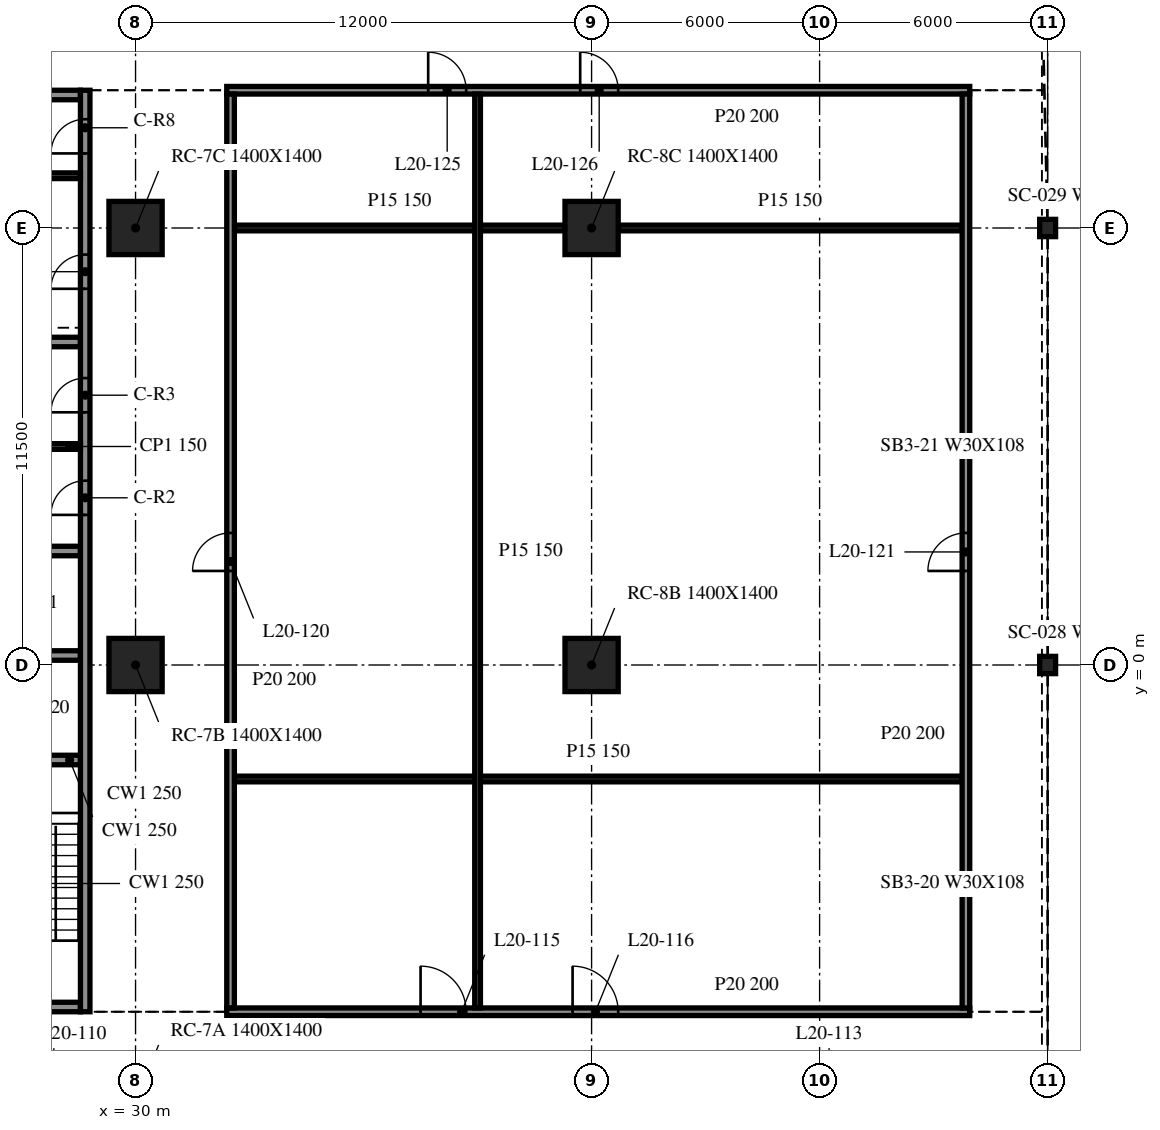
"""IFC4 building model, lengths in metres.
Left out: names, types, materials, properties, quantities, classifications, styles, units other than length and angle.
Written with IfcOpenShell. Run it as: python <this file> out.ifc"""

import sys

from ifc_helpers import new_model, si_unit, direction, frame, frame_2d, origin, origin_2d, place, context, subcontext, project, spatial, rectangle, i_section, extrude, element, fill, save


model = new_model("IFC4")
c1 = context("Model", 3, precision=1e-05, world=origin(), true_north=direction((0.0, 1.0)))
c2 = subcontext(c1, "Body", "Model", "MODEL_VIEW")
j1 = project(units=[si_unit("LENGTHUNIT", "METRE"), si_unit("PLANEANGLEUNIT", "RADIAN")], contexts=[c1])
p1 = place(None, origin())
s1 = spatial("IfcSite", under=j1, at=p1, CompositionType="ELEMENT")
p2 = place(p1, origin())
s2 = spatial("IfcBuilding", under=s1, at=p2, CompositionType="ELEMENT")
p3 = place(p2, frame((0.0, 0.0, 88.9)))
s3 = spatial("IfcBuildingStorey", under=s2, at=p3, CompositionType="ELEMENT", Elevation=88.9)
for number, where, z_axis, x_axis in (
    (1, (30.0, 0.0, -0.34), (0.0, 0.0, 1.0), (1.0, 0.0, 0.0)),
    (2, (30.0, 11.5, -0.34), (0.0, 0.0, 1.0), (1.0, 0.0, 0.0)),
    (3, (42.0, 0.0, -0.34), (0.0, 0.0, 1.0), (1.0, 0.0, 0.0)),
    (4, (42.0, 11.5, -0.34), (0.0, 0.0, 1.0), (1.0, 0.0, 0.0)),
):
    element("IfcColumn", number, at=place(p3, frame(where, z_axis=z_axis, x_axis=x_axis)), inside=s3, PredefinedType="COLUMN", context=c2, shape_type="SweptSolid", body=[
        extrude(rectangle(XDim=1.4, YDim=1.4, at=origin_2d()), origin(), (0.0, 0.0, 1.0), 4.1),
    ])
for number, where, z_axis, x_axis in (
    (5, (54.0, 0.0, -0.34), (0.0, 0.0, 1.0), (1.0, 0.0, 0.0)),
    (6, (54.0, 11.5, -0.34), (0.0, 0.0, 1.0), (1.0, 0.0, 0.0)),
):
    element("IfcColumn", number, at=place(p3, frame(where, z_axis=z_axis, x_axis=x_axis)), inside=s3, PredefinedType="COLUMN", context=c2, shape_type="SweptSolid", body=[
        extrude(i_section(OverallWidth=0.419, OverallDepth=0.455, WebThickness=0.042, FlangeThickness=0.068, at=origin_2d()), origin(), (0.0, 0.0, 1.0), 4.1),
    ])
p4 = place(p3, frame((28.675, -9.125, 0.0), z_axis=(0.0, 0.0, 1.0), x_axis=(0.0, 1.0, 0.0)))
e7 = element("IfcWall", 7, at=p4, inside=s3, PredefinedType="SOLIDWALL", context=c2, shape_type="SweptSolid", body=[
    extrude(rectangle(XDim=24.25, YDim=0.25, at=frame_2d((12.125, 0.0))), origin(), (0.0, 0.0, 1.0), 3.76),
])
p5 = place(p4, frame((13.075, 0.0, 0.0)))
e8 = element("IfcOpeningElement", 8, at=p5, cuts=e7, PredefinedType="OPENING", context=c2, shape_type="SweptSolid", body=[
    extrude(rectangle(XDim=0.9, YDim=2.1, at=frame_2d((0.45, 1.05))), frame((0.0, 0.135, 0.0), z_axis=(0.0, -1.0, 0.0), x_axis=(1.0, 0.0, 0.0)), (0.0, 0.0, 1.0), 0.27),
])
p6 = place(p4, frame((15.775, 0.0, 0.0)))
e9 = element("IfcOpeningElement", 9, at=p6, cuts=e7, PredefinedType="OPENING", context=c2, shape_type="SweptSolid", body=[
    extrude(rectangle(XDim=0.9, YDim=2.1, at=frame_2d((0.45, 1.05))), frame((0.0, 0.135, 0.0), z_axis=(0.0, -1.0, 0.0), x_axis=(1.0, 0.0, 0.0)), (0.0, 0.0, 1.0), 0.27),
])
p7 = place(p4, frame((19.025, 0.0, 0.0)))
e10 = element("IfcOpeningElement", 10, at=p7, cuts=e7, PredefinedType="OPENING", context=c2, shape_type="SweptSolid", body=[
    extrude(rectangle(XDim=0.9, YDim=2.1, at=frame_2d((0.45, 1.05))), frame((0.0, 0.135, 0.0), z_axis=(0.0, -1.0, 0.0), x_axis=(1.0, 0.0, 0.0)), (0.0, 0.0, 1.0), 0.27),
])
p8 = place(p4, frame((22.587, 0.0, 0.0)))
e11 = element("IfcOpeningElement", 11, at=p8, cuts=e7, PredefinedType="OPENING", context=c2, shape_type="SweptSolid", body=[
    extrude(rectangle(XDim=0.9, YDim=2.1, at=frame_2d((0.45, 1.05))), frame((0.0, 0.135, 0.0), z_axis=(0.0, -1.0, 0.0), x_axis=(1.0, 0.0, 0.0)), (0.0, 0.0, 1.0), 0.27),
])
p9 = place(p3, frame((28.55, -9.0, 0.0), z_axis=(0.0, 0.0, 1.0), x_axis=(-1.0, 0.0, 0.0)))
e12 = element("IfcWall", 12, at=p9, inside=s3, PredefinedType="SOLIDWALL", context=c2, shape_type="SweptSolid", body=[
    extrude(rectangle(XDim=9.1, YDim=0.25, at=frame_2d((4.55, 0.0))), origin(), (0.0, 0.0, 1.0), 3.76),
])
p10 = place(p9, frame((3.65, 0.0, 0.0)))
e13 = element("IfcOpeningElement", 13, at=p10, cuts=e12, PredefinedType="OPENING", context=c2, shape_type="SweptSolid", body=[
    extrude(rectangle(XDim=1.8, YDim=2.1, at=frame_2d((0.9, 1.05))), frame((0.0, 0.135, 0.0), z_axis=(0.0, -1.0, 0.0), x_axis=(1.0, 0.0, 0.0)), (0.0, 0.0, 1.0), 0.27),
])
p11 = place(p3, frame((19.45, 15.0, 0.0), z_axis=(0.0, 0.0, 1.0), x_axis=(1.0, 0.0, 0.0)))
e14 = element("IfcWall", 14, at=p11, inside=s3, PredefinedType="SOLIDWALL", context=c2, shape_type="SweptSolid", body=[
    extrude(rectangle(XDim=9.1, YDim=0.25, at=frame_2d((4.55, 0.0))), origin(), (0.0, 0.0, 1.0), 3.76),
])
p12 = place(p11, frame((3.65, 0.0, 0.0)))
e15 = element("IfcOpeningElement", 15, at=p12, cuts=e14, PredefinedType="OPENING", context=c2, shape_type="SweptSolid", body=[
    extrude(rectangle(XDim=1.8, YDim=2.1, at=frame_2d((0.9, 1.05))), frame((0.0, 0.135, 0.0), z_axis=(0.0, -1.0, 0.0), x_axis=(1.0, 0.0, 0.0)), (0.0, 0.0, 1.0), 0.27),
])
for number, where, z_axis, x_axis in (
    (16, (25.7, -2.5, 0.0), (0.0, 0.0, 1.0), (1.0, 0.0, 0.0)),
    (17, (25.7, 0.25, 0.0), (0.0, 0.0, 1.0), (1.0, 0.0, 0.0)),
    (18, (25.7, 3.0, 0.0), (0.0, 0.0, 1.0), (1.0, 0.0, 0.0)),
    (19, (25.7, 8.5, 0.0), (0.0, 0.0, 1.0), (1.0, 0.0, 0.0)),
):
    element("IfcWall", number, at=place(p3, frame(where, z_axis=z_axis, x_axis=x_axis)), inside=s3, PredefinedType="SOLIDWALL", context=c2, shape_type="SweptSolid", body=[
        extrude(rectangle(XDim=2.85, YDim=0.25, at=frame_2d((1.425, 0.0))), origin(), (0.0, 0.0, 1.0), 3.76),
    ])
for number, where, z_axis, x_axis in (
    (20, (25.7, 5.75, 0.0), (0.0, 0.0, 1.0), (1.0, 0.0, 0.0)),
    (21, (25.7, 12.875, 0.0), (0.0, 0.0, 1.0), (1.0, 0.0, 0.0)),
):
    element("IfcWall", number, at=place(p3, frame(where, z_axis=z_axis, x_axis=x_axis)), inside=s3, PredefinedType="PARTITIONING", context=c2, shape_type="SweptSolid", body=[
        extrude(rectangle(XDim=2.85, YDim=0.15, at=frame_2d((1.425, 0.0))), origin(), (0.0, 0.0, 1.0), 3.76),
    ])
p13 = place(p3, frame((32.4, -9.125, 0.0), z_axis=(0.0, 0.0, 1.0), x_axis=(1.0, 0.0, 0.0)))
e22 = element("IfcWall", 22, at=p13, inside=s3, PredefinedType="PARTITIONING", context=c2, shape_type="SweptSolid", body=[
    extrude(rectangle(XDim=19.55, YDim=0.2, at=frame_2d((9.775, 0.0))), origin(), (0.0, 0.0, 1.0), 3.76),
])
p14 = place(p13, frame((5.1, 0.0, 0.0)))
e23 = element("IfcOpeningElement", 23, at=p14, cuts=e22, PredefinedType="OPENING", context=c2, shape_type="SweptSolid", body=[
    extrude(rectangle(XDim=1.2, YDim=2.1, at=frame_2d((0.6, 1.05))), frame((0.0, 0.11, 0.0), z_axis=(0.0, -1.0, 0.0), x_axis=(1.0, 0.0, 0.0)), (0.0, 0.0, 1.0), 0.22),
])
p15 = place(p13, frame((9.1, 0.0, 0.0)))
e24 = element("IfcOpeningElement", 24, at=p15, cuts=e22, PredefinedType="OPENING", context=c2, shape_type="SweptSolid", body=[
    extrude(rectangle(XDim=1.2, YDim=2.1, at=frame_2d((0.6, 1.05))), frame((0.0, 0.11, 0.0), z_axis=(0.0, -1.0, 0.0), x_axis=(1.0, 0.0, 0.0)), (0.0, 0.0, 1.0), 0.22),
])
p16 = place(p3, frame((32.6, -3.0, 0.0), z_axis=(0.0, 0.0, 1.0), x_axis=(1.0, 0.0, 0.0)))
e25 = element("IfcWall", 25, at=p16, inside=s3, PredefinedType="PARTITIONING", context=c2, shape_type="SweptSolid", body=[
    extrude(rectangle(XDim=19.15, YDim=0.15, at=frame_2d((9.575, 0.0))), origin(), (0.0, 0.0, 1.0), 3.76),
])
p17 = place(p3, frame((32.6, 11.5, 0.0), z_axis=(0.0, 0.0, 1.0), x_axis=(1.0, 0.0, 0.0)))
e26 = element("IfcWall", 26, at=p17, inside=s3, PredefinedType="PARTITIONING", context=c2, shape_type="SweptSolid", body=[
    extrude(rectangle(XDim=8.7, YDim=0.15, at=frame_2d((4.35, 0.0))), origin(), (0.0, 0.0, 1.0), 3.76),
])
p18 = place(p3, frame((42.7, 11.5, 0.0), z_axis=(0.0, 0.0, 1.0), x_axis=(1.0, 0.0, 0.0)))
e27 = element("IfcWall", 27, at=p18, inside=s3, PredefinedType="PARTITIONING", context=c2, shape_type="SweptSolid", body=[
    extrude(rectangle(XDim=9.05, YDim=0.15, at=frame_2d((4.525, 0.0))), origin(), (0.0, 0.0, 1.0), 3.76),
])
p19 = place(p3, frame((32.4, 15.125, 0.0), z_axis=(0.0, 0.0, 1.0), x_axis=(1.0, 0.0, 0.0)))
e28 = element("IfcWall", 28, at=p19, inside=s3, PredefinedType="PARTITIONING", context=c2, shape_type="SweptSolid", body=[
    extrude(rectangle(XDim=19.55, YDim=0.2, at=frame_2d((9.775, 0.0))), origin(), (0.0, 0.0, 1.0), 3.76),
])
p20 = place(p19, frame((5.3, 0.0, 0.0)))
e29 = element("IfcOpeningElement", 29, at=p20, cuts=e28, PredefinedType="OPENING", context=c2, shape_type="SweptSolid", body=[
    extrude(rectangle(XDim=1.0, YDim=2.1, at=frame_2d((0.5, 1.05))), frame((0.0, 0.11, 0.0), z_axis=(0.0, -1.0, 0.0), x_axis=(1.0, 0.0, 0.0)), (0.0, 0.0, 1.0), 0.22),
])
p21 = place(p19, frame((9.3, 0.0, 0.0)))
e30 = element("IfcOpeningElement", 30, at=p21, cuts=e28, PredefinedType="OPENING", context=c2, shape_type="SweptSolid", body=[
    extrude(rectangle(XDim=1.0, YDim=2.1, at=frame_2d((0.5, 1.05))), frame((0.0, 0.11, 0.0), z_axis=(0.0, -1.0, 0.0), x_axis=(1.0, 0.0, 0.0)), (0.0, 0.0, 1.0), 0.22),
])
p22 = place(p3, frame((32.5, -9.025, 0.0), z_axis=(0.0, 0.0, 1.0), x_axis=(0.0, 1.0, 0.0)))
e31 = element("IfcWall", 31, at=p22, inside=s3, PredefinedType="PARTITIONING", context=c2, shape_type="SweptSolid", body=[
    extrude(rectangle(XDim=24.05, YDim=0.2, at=frame_2d((12.025, 0.0))), origin(), (0.0, 0.0, 1.0), 3.76),
])
p23 = place(p22, frame((11.5, 0.0, 0.0)))
e32 = element("IfcOpeningElement", 32, at=p23, cuts=e31, PredefinedType="OPENING", context=c2, shape_type="SweptSolid", body=[
    extrude(rectangle(XDim=1.0, YDim=2.1, at=frame_2d((0.5, 1.05))), frame((0.0, 0.11, 0.0), z_axis=(0.0, -1.0, 0.0), x_axis=(1.0, 0.0, 0.0)), (0.0, 0.0, 1.0), 0.22),
])
p24 = place(p3, frame((39.0, -9.025, 0.0), z_axis=(0.0, 0.0, 1.0), x_axis=(0.0, 1.0, 0.0)))
e33 = element("IfcWall", 33, at=p24, inside=s3, PredefinedType="PARTITIONING", context=c2, shape_type="SweptSolid", body=[
    extrude(rectangle(XDim=24.05, YDim=0.15, at=frame_2d((12.025, 0.0))), origin(), (0.0, 0.0, 1.0), 3.76),
])
p25 = place(p3, frame((51.85, -9.025, 0.0), z_axis=(0.0, 0.0, 1.0), x_axis=(0.0, 1.0, 0.0)))
e34 = element("IfcWall", 34, at=p25, inside=s3, PredefinedType="PARTITIONING", context=c2, shape_type="SweptSolid", body=[
    extrude(rectangle(XDim=24.05, YDim=0.2, at=frame_2d((12.025, 0.0))), origin(), (0.0, 0.0, 1.0), 3.76),
])
p26 = place(p25, frame((11.5, 0.0, 0.0)))
e35 = element("IfcOpeningElement", 35, at=p26, cuts=e34, PredefinedType="OPENING", context=c2, shape_type="SweptSolid", body=[
    extrude(rectangle(XDim=1.0, YDim=2.1, at=frame_2d((0.5, 1.05))), frame((0.0, 0.11, 0.0), z_axis=(0.0, -1.0, 0.0), x_axis=(1.0, 0.0, 0.0)), (0.0, 0.0, 1.0), 0.22),
])
p27 = place(p5, origin())
e36 = element("IfcDoor", 36, at=p27, inside=s3, OperationType="SINGLE_SWING_RIGHT", PredefinedType="DOOR", context=c2, shape_type="SweptSolid", body=[
    extrude(rectangle(XDim=0.9, YDim=2.1, at=frame_2d((0.45, 1.05))), frame((0.0, 0.025, 0.0), z_axis=(0.0, -1.0, 0.0), x_axis=(1.0, 0.0, 0.0)), (0.0, 0.0, 1.0), 0.05),
])
fill(e8, e36)
p28 = place(p6, origin())
e37 = element("IfcDoor", 37, at=p28, inside=s3, OperationType="SINGLE_SWING_LEFT", PredefinedType="DOOR", context=c2, shape_type="SweptSolid", body=[
    extrude(rectangle(XDim=0.9, YDim=2.1, at=frame_2d((0.45, 1.05))), frame((0.0, 0.025, 0.0), z_axis=(0.0, -1.0, 0.0), x_axis=(1.0, 0.0, 0.0)), (0.0, 0.0, 1.0), 0.05),
])
fill(e9, e37)
p29 = place(p7, origin())
e38 = element("IfcDoor", 38, at=p29, inside=s3, OperationType="SINGLE_SWING_LEFT", PredefinedType="DOOR", context=c2, shape_type="SweptSolid", body=[
    extrude(rectangle(XDim=0.9, YDim=2.1, at=frame_2d((0.45, 1.05))), frame((0.0, 0.025, 0.0), z_axis=(0.0, -1.0, 0.0), x_axis=(1.0, 0.0, 0.0)), (0.0, 0.0, 1.0), 0.05),
])
fill(e10, e38)
p30 = place(p8, origin())
e39 = element("IfcDoor", 39, at=p30, inside=s3, OperationType="SINGLE_SWING_RIGHT", PredefinedType="DOOR", context=c2, shape_type="SweptSolid", body=[
    extrude(rectangle(XDim=0.9, YDim=2.1, at=frame_2d((0.45, 1.05))), frame((0.0, 0.025, 0.0), z_axis=(0.0, -1.0, 0.0), x_axis=(1.0, 0.0, 0.0)), (0.0, 0.0, 1.0), 0.05),
])
fill(e11, e39)
p31 = place(p14, origin())
e40 = element("IfcDoor", 40, at=p31, inside=s3, OperationType="SINGLE_SWING_LEFT", PredefinedType="DOOR", context=c2, shape_type="SweptSolid", body=[
    extrude(rectangle(XDim=1.2, YDim=2.1, at=frame_2d((0.6, 1.05))), frame((0.0, 0.025, 0.0), z_axis=(0.0, -1.0, 0.0), x_axis=(1.0, 0.0, 0.0)), (0.0, 0.0, 1.0), 0.05),
])
fill(e23, e40)
p32 = place(p15, origin())
e41 = element("IfcDoor", 41, at=p32, inside=s3, OperationType="SINGLE_SWING_LEFT", PredefinedType="DOOR", context=c2, shape_type="SweptSolid", body=[
    extrude(rectangle(XDim=1.2, YDim=2.1, at=frame_2d((0.6, 1.05))), frame((0.0, 0.025, 0.0), z_axis=(0.0, -1.0, 0.0), x_axis=(1.0, 0.0, 0.0)), (0.0, 0.0, 1.0), 0.05),
])
fill(e24, e41)
p33 = place(p23, origin())
e42 = element("IfcDoor", 42, at=p33, inside=s3, OperationType="SINGLE_SWING_RIGHT", PredefinedType="DOOR", context=c2, shape_type="SweptSolid", body=[
    extrude(rectangle(XDim=1.0, YDim=2.1, at=frame_2d((0.5, 1.05))), frame((0.0, 0.025, 0.0), z_axis=(0.0, -1.0, 0.0), x_axis=(1.0, 0.0, 0.0)), (0.0, 0.0, 1.0), 0.05),
])
fill(e32, e42)
p34 = place(p26, origin())
e43 = element("IfcDoor", 43, at=p34, inside=s3, OperationType="SINGLE_SWING_LEFT", PredefinedType="DOOR", context=c2, shape_type="SweptSolid", body=[
    extrude(rectangle(XDim=1.0, YDim=2.1, at=frame_2d((0.5, 1.05))), frame((0.0, 0.025, 0.0), z_axis=(0.0, -1.0, 0.0), x_axis=(1.0, 0.0, 0.0)), (0.0, 0.0, 1.0), 0.05),
])
fill(e35, e43)
p35 = place(p20, origin())
e44 = element("IfcDoor", 44, at=p35, inside=s3, OperationType="SINGLE_SWING_RIGHT", PredefinedType="DOOR", context=c2, shape_type="SweptSolid", body=[
    extrude(rectangle(XDim=1.0, YDim=2.1, at=frame_2d((0.5, 1.05))), frame((0.0, 0.025, 0.0), z_axis=(0.0, -1.0, 0.0), x_axis=(1.0, 0.0, 0.0)), (0.0, 0.0, 1.0), 0.05),
])
fill(e29, e44)
p36 = place(p21, origin())
e45 = element("IfcDoor", 45, at=p36, inside=s3, OperationType="SINGLE_SWING_LEFT", PredefinedType="DOOR", context=c2, shape_type="SweptSolid", body=[
    extrude(rectangle(XDim=1.0, YDim=2.1, at=frame_2d((0.5, 1.05))), frame((0.0, 0.025, 0.0), z_axis=(0.0, -1.0, 0.0), x_axis=(1.0, 0.0, 0.0)), (0.0, 0.0, 1.0), 0.05),
])
fill(e30, e45)
save(model, sys.argv[1])
